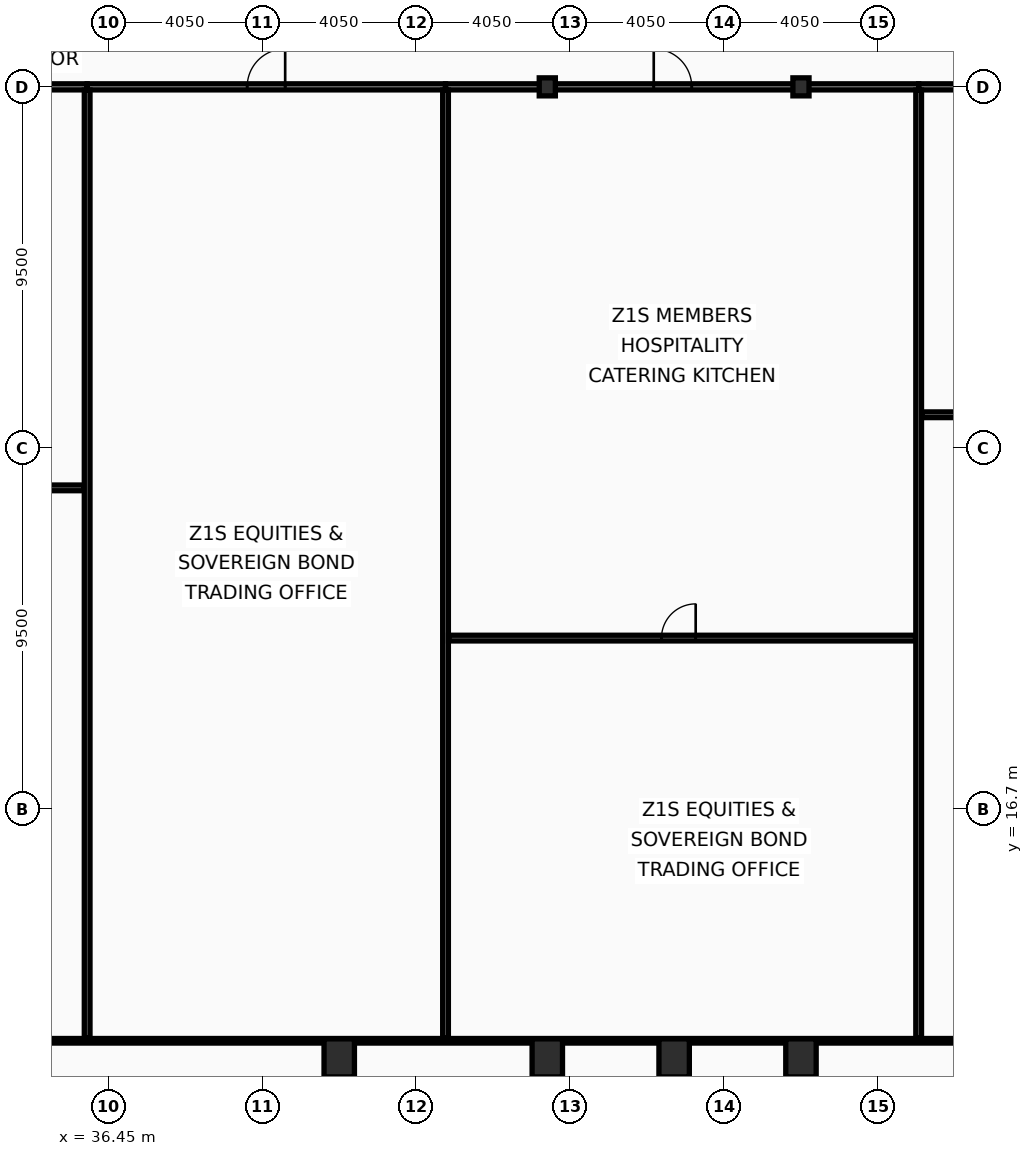
"""IFC4 building model, lengths in metres.
Left out: names, types, materials, properties, quantities, classifications, styles, units other than length and angle.
Written with IfcOpenShell. Run it as: python <this file> out.ifc"""

import sys

from ifc_helpers import new_model, si_unit, direction, frame, frame_2d, origin, origin_2d, place, context, subcontext, project, spatial, rectangle, hollow_rectangle, i_section, extrude, element, fill, save


model = new_model("IFC4")
c1 = context("Model", 3, precision=1e-05, world=origin(), true_north=direction((0.0, 1.0)))
c2 = subcontext(c1, "Body", "Model", "MODEL_VIEW")
j1 = project(units=[si_unit("LENGTHUNIT", "METRE"), si_unit("PLANEANGLEUNIT", "RADIAN")], contexts=[c1])
p1 = place(None, origin())
s1 = spatial("IfcSite", under=j1, at=p1, CompositionType="ELEMENT")
p2 = place(p1, origin())
s2 = spatial("IfcBuilding", under=s1, at=p2, CompositionType="ELEMENT")
p3 = place(p2, frame((0.0, 0.0, 37.8)))
s3 = spatial("IfcBuildingStorey", under=s2, at=p3, CompositionType="ELEMENT", Elevation=37.8)
for number, where, z_axis, x_axis in (
    (1, (42.525, 10.15, 0.0), (0.0, 0.0, 1.0), (1.0, 0.0, 0.0)),
    (2, (48.0, 10.15, 0.0), (0.0, 0.0, 1.0), (1.0, 0.0, 0.0)),
    (3, (51.337, 10.15, 0.0), (0.0, 0.0, 1.0), (1.0, 0.0, 0.0)),
    (4, (54.675, 10.15, 0.0), (0.0, 0.0, 1.0), (1.0, 0.0, 0.0)),
):
    element("IfcColumn", number, at=place(p3, frame(where, z_axis=z_axis, x_axis=x_axis)), inside=s3, PredefinedType="COLUMN", context=c2, shape_type="SweptSolid", body=[
        extrude(hollow_rectangle(XDim=0.8, YDim=1.0, WallThickness=0.055, at=origin_2d()), origin(), (0.0, 0.0, 1.0), 4.0),
    ])
for number, where, z_axis, x_axis in (
    (5, (48.0, 35.7, 0.0), (0.0, 0.0, 1.0), (1.0, 0.0, 0.0)),
    (6, (54.675, 35.7, 0.0), (0.0, 0.0, 1.0), (1.0, 0.0, 0.0)),
):
    element("IfcColumn", number, at=place(p3, frame(where, z_axis=z_axis, x_axis=x_axis)), inside=s3, PredefinedType="COLUMN", context=c2, shape_type="SweptSolid", body=[
        extrude(i_section(OverallWidth=0.424, OverallDepth=0.474, WebThickness=0.048, FlangeThickness=0.077, at=origin_2d()), origin(), (0.0, 0.0, 1.0), 4.0),
    ])
p4 = place(p3, frame((20.891, 35.7, 0.0), z_axis=(0.0, 0.0, 1.0), x_axis=(1.0, 0.0, 0.0)))
e7 = element("IfcWall", 7, at=p4, inside=s3, PredefinedType="PARTITIONING", context=c2, shape_type="SweptSolid", body=[
    extrude(rectangle(XDim=15.0, YDim=0.16, at=frame_2d((7.5, 0.0))), origin(), (0.0, 0.0, 1.0), 3.01),
])
p5 = place(p4, frame((6.55, 0.0, 0.0)))
e8 = element("IfcOpeningElement", 8, at=p5, cuts=e7, PredefinedType="OPENING", context=c2, shape_type="SweptSolid", body=[
    extrude(rectangle(XDim=1.6, YDim=2.15, at=frame_2d((0.8, 1.075))), frame((0.0, 0.09, 0.0), z_axis=(0.0, -1.0, 0.0), x_axis=(1.0, 0.0, 0.0)), (0.0, 0.0, 1.0), 0.18),
])
p6 = place(p3, frame((20.971, 25.148, 0.0), z_axis=(0.0, 0.0, 1.0), x_axis=(1.0, 0.0, 0.0)))
e9 = element("IfcWall", 9, at=p6, inside=s3, PredefinedType="PARTITIONING", context=c2, shape_type="SweptSolid", body=[
    extrude(rectangle(XDim=14.841, YDim=0.15, at=frame_2d((7.42, 0.0))), origin(), (0.0, 0.0, 1.0), 3.01),
])
p7 = place(p6, frame((6.75, 0.0, 0.0)))
e10 = element("IfcOpeningElement", 10, at=p7, cuts=e9, PredefinedType="OPENING", context=c2, shape_type="SweptSolid", body=[
    extrude(rectangle(XDim=0.9, YDim=2.05, at=frame_2d((0.45, 1.025))), frame((0.0, 0.085, 0.0), z_axis=(0.0, -1.0, 0.0), x_axis=(1.0, 0.0, 0.0)), (0.0, 0.0, 1.0), 0.17),
])
p8 = place(p3, frame((35.892, 35.7, 0.0), z_axis=(0.0, 0.0, 1.0), x_axis=(1.0, 0.0, 0.0)))
e11 = element("IfcWall", 11, at=p8, inside=s3, PredefinedType="PARTITIONING", context=c2, shape_type="SweptSolid", body=[
    extrude(rectangle(XDim=9.43, YDim=0.16, at=frame_2d((4.715, 0.0))), origin(), (0.0, 0.0, 1.0), 3.01),
])
p9 = place(p8, frame((4.211, 0.0, 0.0)))
e12 = element("IfcOpeningElement", 12, at=p9, cuts=e11, PredefinedType="OPENING", context=c2, shape_type="SweptSolid", body=[
    extrude(rectangle(XDim=1.0, YDim=2.05, at=frame_2d((0.5, 1.025))), frame((0.0, 0.09, 0.0), z_axis=(0.0, -1.0, 0.0), x_axis=(1.0, 0.0, 0.0)), (0.0, 0.0, 1.0), 0.18),
])
p10 = place(p3, frame((35.892, 10.665, 0.0), z_axis=(0.0, 0.0, 1.0), x_axis=(0.0, 1.0, 0.0)))
e13 = element("IfcWall", 13, at=p10, inside=s3, PredefinedType="PARTITIONING", context=c2, shape_type="SweptSolid", body=[
    extrude(rectangle(XDim=24.95, YDim=0.15, at=frame_2d((12.475, 0.0))), origin(), (0.0, 0.0, 1.0), 3.21),
])
p11 = place(p3, frame((45.322, 35.7, 0.0), z_axis=(0.0, 0.0, 1.0), x_axis=(1.0, 0.0, 0.0)))
e14 = element("IfcWall", 14, at=p11, inside=s3, PredefinedType="PARTITIONING", context=c2, shape_type="SweptSolid", body=[
    extrude(rectangle(XDim=12.45, YDim=0.16, at=frame_2d((6.225, 0.0))), origin(), (0.0, 0.0, 1.0), 3.01),
])
p12 = place(p11, frame((5.479, 0.0, 0.0)))
e15 = element("IfcOpeningElement", 15, at=p12, cuts=e14, PredefinedType="OPENING", context=c2, shape_type="SweptSolid", body=[
    extrude(rectangle(XDim=1.0, YDim=2.05, at=frame_2d((0.5, 1.025))), frame((0.0, 0.09, 0.0), z_axis=(0.0, -1.0, 0.0), x_axis=(1.0, 0.0, 0.0)), (0.0, 0.0, 1.0), 0.18),
])
p13 = place(p3, frame((45.322, 10.665, 0.0), z_axis=(0.0, 0.0, 1.0), x_axis=(0.0, 1.0, 0.0)))
e16 = element("IfcWall", 16, at=p13, inside=s3, PredefinedType="PARTITIONING", context=c2, shape_type="SweptSolid", body=[
    extrude(rectangle(XDim=24.95, YDim=0.15, at=frame_2d((12.475, 0.0))), origin(), (0.0, 0.0, 1.0), 3.21),
])
p14 = place(p3, frame((45.402, 21.196, 0.0), z_axis=(0.0, 0.0, 1.0), x_axis=(1.0, 0.0, 0.0)))
e17 = element("IfcWall", 17, at=p14, inside=s3, PredefinedType="PARTITIONING", context=c2, shape_type="SweptSolid", body=[
    extrude(rectangle(XDim=12.29, YDim=0.15, at=frame_2d((6.145, 0.0))), origin(), (0.0, 0.0, 1.0), 3.01),
])
p15 = place(p14, frame((5.603, 0.0, 0.0)))
e18 = element("IfcOpeningElement", 18, at=p15, cuts=e17, PredefinedType="OPENING", context=c2, shape_type="SweptSolid", body=[
    extrude(rectangle(XDim=0.9, YDim=2.05, at=frame_2d((0.45, 1.025))), frame((0.0, 0.085, 0.0), z_axis=(0.0, -1.0, 0.0), x_axis=(1.0, 0.0, 0.0)), (0.0, 0.0, 1.0), 0.17),
])
p16 = place(p3, frame((57.772, 35.7, 0.0), z_axis=(0.0, 0.0, 1.0), x_axis=(1.0, 0.0, 0.0)))
e19 = element("IfcWall", 19, at=p16, inside=s3, PredefinedType="PARTITIONING", context=c2, shape_type="SweptSolid", body=[
    extrude(rectangle(XDim=13.098, YDim=0.16, at=frame_2d((6.549, 0.0))), origin(), (0.0, 0.0, 1.0), 3.01),
])
p17 = place(p16, frame((5.751, 0.0, 0.0)))
e20 = element("IfcOpeningElement", 20, at=p17, cuts=e19, PredefinedType="OPENING", context=c2, shape_type="SweptSolid", body=[
    extrude(rectangle(XDim=1.0, YDim=2.05, at=frame_2d((0.5, 1.025))), frame((0.0, 0.09, 0.0), z_axis=(0.0, -1.0, 0.0), x_axis=(1.0, 0.0, 0.0)), (0.0, 0.0, 1.0), 0.18),
])
p18 = place(p3, frame((57.772, 10.665, 0.0), z_axis=(0.0, 0.0, 1.0), x_axis=(0.0, 1.0, 0.0)))
e21 = element("IfcWall", 21, at=p18, inside=s3, PredefinedType="PARTITIONING", context=c2, shape_type="SweptSolid", body=[
    extrude(rectangle(XDim=24.95, YDim=0.15, at=frame_2d((12.475, 0.0))), origin(), (0.0, 0.0, 1.0), 3.01),
])
p19 = place(p3, frame((57.852, 27.072, 0.0), z_axis=(0.0, 0.0, 1.0), x_axis=(1.0, 0.0, 0.0)))
e22 = element("IfcWall", 22, at=p19, inside=s3, PredefinedType="PARTITIONING", context=c2, shape_type="SweptSolid", body=[
    extrude(rectangle(XDim=12.953, YDim=0.15, at=frame_2d((6.477, 0.0))), origin(), (0.0, 0.0, 1.0), 3.82),
])
p20 = place(p19, frame((5.894, 0.0, 0.0)))
e23 = element("IfcOpeningElement", 23, at=p20, cuts=e22, PredefinedType="OPENING", context=c2, shape_type="SweptSolid", body=[
    extrude(rectangle(XDim=0.9, YDim=2.05, at=frame_2d((0.45, 1.025))), frame((0.0, 0.085, 0.0), z_axis=(0.0, -1.0, 0.0), x_axis=(1.0, 0.0, 0.0)), (0.0, 0.0, 1.0), 0.17),
])
p21 = place(p3, frame((2.095, 10.6, 0.0), z_axis=(0.0, 0.0, 1.0), x_axis=(1.0, 0.0, 0.0)))
e24 = element("IfcWall", 24, at=p21, inside=s3, PredefinedType="PARTITIONING", context=c2, shape_type="SweptSolid", body=[
    extrude(rectangle(XDim=68.71, YDim=0.12, at=frame_2d((34.355, 0.0))), origin(), (0.0, 0.0, 1.0), 3.01),
])
p22 = place(p9, origin())
e25 = element("IfcDoor", 25, at=p22, inside=s3, OperationType="SINGLE_SWING_RIGHT", PredefinedType="DOOR", context=c2, shape_type="SweptSolid", body=[
    extrude(rectangle(XDim=1.0, YDim=2.05, at=frame_2d((0.5, 1.025))), frame((0.0, 0.025, 0.0), z_axis=(0.0, -1.0, 0.0), x_axis=(1.0, 0.0, 0.0)), (0.0, 0.0, 1.0), 0.05),
])
fill(e12, e25)
p23 = place(p12, origin())
e26 = element("IfcDoor", 26, at=p23, inside=s3, OperationType="SINGLE_SWING_LEFT", PredefinedType="DOOR", context=c2, shape_type="SweptSolid", body=[
    extrude(rectangle(XDim=1.0, YDim=2.05, at=frame_2d((0.5, 1.025))), frame((0.0, 0.025, 0.0), z_axis=(0.0, -1.0, 0.0), x_axis=(1.0, 0.0, 0.0)), (0.0, 0.0, 1.0), 0.05),
])
fill(e15, e26)
p24 = place(p15, origin())
e27 = element("IfcDoor", 27, at=p24, inside=s3, OperationType="SINGLE_SWING_RIGHT", PredefinedType="DOOR", context=c2, shape_type="SweptSolid", body=[
    extrude(rectangle(XDim=0.9, YDim=2.05, at=frame_2d((0.45, 1.025))), frame((0.0, 0.025, 0.0), z_axis=(0.0, -1.0, 0.0), x_axis=(1.0, 0.0, 0.0)), (0.0, 0.0, 1.0), 0.05),
])
fill(e18, e27)
save(model, sys.argv[1])
